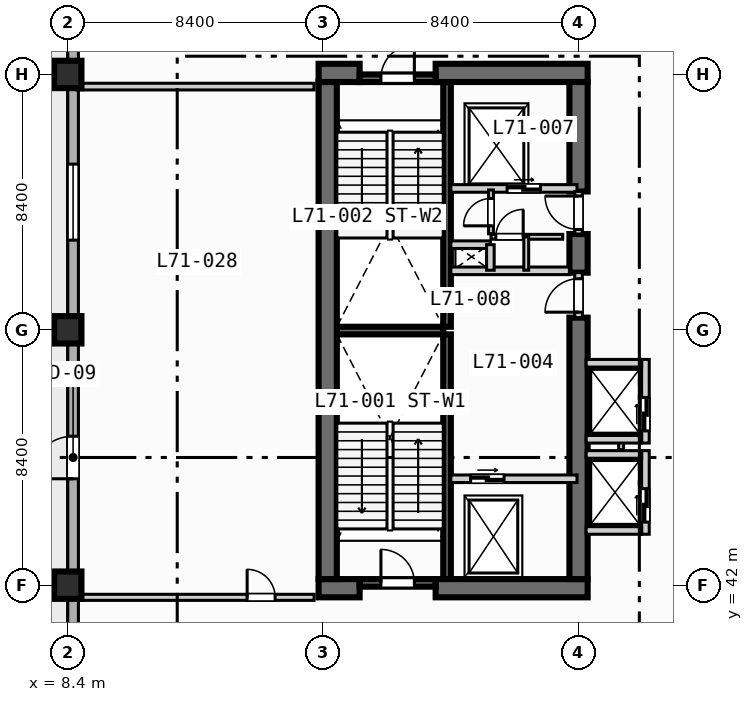
"""IFC4 building model, lengths in metres.
Left out: names, types, materials, properties, quantities, classifications, styles, units other than length and angle.
Written with IfcOpenShell. Run it as: python <this file> out.ifc"""

import sys

from ifc_helpers import new_model, si_unit, direction, frame, frame_2d, origin, origin_2d, place, context, subcontext, project, spatial, rectangle, extrude, element, fill, save


model = new_model("IFC4")
c1 = context("Model", 3, precision=1e-05, world=origin(), true_north=direction((0.0, 1.0)))
c2 = subcontext(c1, "Body", "Model", "MODEL_VIEW")
j1 = project(units=[si_unit("LENGTHUNIT", "METRE"), si_unit("PLANEANGLEUNIT", "RADIAN")], contexts=[c1])
p1 = place(None, origin())
s1 = spatial("IfcSite", under=j1, at=p1, CompositionType="ELEMENT")
p2 = place(p1, origin())
s2 = spatial("IfcBuilding", under=s1, at=p2, CompositionType="ELEMENT")
p3 = place(p2, frame((0.0, 0.0, 286.0)))
s3 = spatial("IfcBuildingStorey", under=s2, at=p3, CompositionType="ELEMENT", Elevation=286.0)
for number, where, z_axis, x_axis in (
    (1, (20.875, 42.2, 0.0), (0.0, 0.0, 1.0), (0.0, 1.0, 0.0)),
    (2, (20.875, 50.5, 0.0), (0.0, 0.0, 1.0), (0.0, 1.0, 0.0)),
):
    element("IfcWall", number, at=place(p3, frame(where, z_axis=z_axis, x_axis=x_axis)), inside=s3, PredefinedType="SOLIDWALL", context=c2, shape_type="SweptSolid", body=[
        extrude(rectangle(XDim=8.05, YDim=0.25, at=frame_2d((4.025, 0.0))), origin(), (0.0, 0.0, 1.0), 4.17),
    ])
p4 = place(p3, frame((17.25, 50.375, 0.0), z_axis=(0.0, 0.0, 1.0), x_axis=(1.0, 0.0, 0.0)))
e3 = element("IfcWall", 3, at=p4, inside=s3, PredefinedType="SOLIDWALL", context=c2, shape_type="SweptSolid", body=[
    extrude(rectangle(XDim=3.5, YDim=0.25, at=frame_2d((1.75, 0.0))), origin(), (0.0, 0.0, 1.0), 4.17),
])
p5 = place(p3, frame((16.65, 41.9, 0.0), z_axis=(0.0, 0.0, 1.0), x_axis=(1.0, 0.0, 0.0)))
e4 = element("IfcWall", 4, at=p5, inside=s3, PredefinedType="SHEAR", context=c2, shape_type="SweptSolid", body=[
    extrude(rectangle(XDim=1.35, YDim=0.6, at=frame_2d((0.675, 0.0))), origin(), (0.0, 0.0, 1.0), 4.17),
])
p6 = place(p3, frame((20.5, 41.9, 0.0), z_axis=(0.0, 0.0, 1.0), x_axis=(1.0, 0.0, 0.0)))
e5 = element("IfcWall", 5, at=p6, inside=s3, PredefinedType="SHEAR", context=c2, shape_type="SweptSolid", body=[
    extrude(rectangle(XDim=5.0, YDim=0.6, at=frame_2d((2.5, 0.0))), origin(), (0.0, 0.0, 1.0), 4.17),
])
p7 = place(p3, frame((16.65, 58.85, 0.0), z_axis=(0.0, 0.0, 1.0), x_axis=(1.0, 0.0, 0.0)))
e6 = element("IfcWall", 6, at=p7, inside=s3, PredefinedType="SHEAR", context=c2, shape_type="SweptSolid", body=[
    extrude(rectangle(XDim=1.35, YDim=0.6, at=frame_2d((0.675, 0.0))), origin(), (0.0, 0.0, 1.0), 4.17),
])
p8 = place(p3, frame((20.5, 58.85, 0.0), z_axis=(0.0, 0.0, 1.0), x_axis=(1.0, 0.0, 0.0)))
e7 = element("IfcWall", 7, at=p8, inside=s3, PredefinedType="SHEAR", context=c2, shape_type="SweptSolid", body=[
    extrude(rectangle(XDim=5.0, YDim=0.6, at=frame_2d((2.5, 0.0))), origin(), (0.0, 0.0, 1.0), 4.17),
])
p9 = place(p3, frame((16.95, 42.2, 0.0), z_axis=(0.0, 0.0, 1.0), x_axis=(0.0, 1.0, 0.0)))
e8 = element("IfcWall", 8, at=p9, inside=s3, PredefinedType="SHEAR", context=c2, shape_type="SweptSolid", body=[
    extrude(rectangle(XDim=16.35, YDim=0.6, at=frame_2d((8.175, 0.0))), origin(), (0.0, 0.0, 1.0), 4.17),
])
p10 = place(p3, frame((25.2, 42.2, 0.0), z_axis=(0.0, 0.0, 1.0), x_axis=(0.0, 1.0, 0.0)))
e9 = element("IfcWall", 9, at=p10, inside=s3, PredefinedType="SHEAR", context=c2, shape_type="SweptSolid", body=[
    extrude(rectangle(XDim=8.6, YDim=0.6, at=frame_2d((4.3, 0.0))), origin(), (0.0, 0.0, 1.0), 4.17),
])
p11 = place(p3, frame((25.2, 52.28, 0.0), z_axis=(0.0, 0.0, 1.0), x_axis=(0.0, 1.0, 0.0)))
e10 = element("IfcWall", 10, at=p11, inside=s3, PredefinedType="SHEAR", context=c2, shape_type="SweptSolid", body=[
    extrude(rectangle(XDim=1.27, YDim=0.6, at=frame_2d((0.635, 0.0))), origin(), (0.0, 0.0, 1.0), 4.17),
])
p12 = place(p3, frame((25.2, 54.95, 0.0), z_axis=(0.0, 0.0, 1.0), x_axis=(0.0, 1.0, 0.0)))
e11 = element("IfcWall", 11, at=p12, inside=s3, PredefinedType="SHEAR", context=c2, shape_type="SweptSolid", body=[
    extrude(rectangle(XDim=3.6, YDim=0.6, at=frame_2d((1.8, 0.0))), origin(), (0.0, 0.0, 1.0), 4.17),
])
for number, where, z_axis, x_axis in (
    (12, (8.4, 42.0, 0.0), (0.0, 0.0, 1.0), (1.0, 0.0, 0.0)),
    (13, (8.4, 50.4, 0.0), (0.0, 0.0, 1.0), (1.0, 0.0, 0.0)),
    (14, (8.4, 58.8, 0.0), (0.0, 0.0, 1.0), (1.0, 0.0, 0.0)),
):
    element("IfcColumn", number, at=place(p3, frame(where, z_axis=z_axis, x_axis=x_axis)), inside=s3, PredefinedType="COLUMN", context=c2, shape_type="SweptSolid", body=[
        extrude(rectangle(XDim=0.9, YDim=0.9, at=origin_2d()), origin(), (0.0, 0.0, 1.0), 4.4),
    ])
p13 = place(p3, frame((8.575, 11.575, 0.0), z_axis=(0.0, 0.0, 1.0), x_axis=(0.0, 1.0, 0.0)))
e15 = element("IfcWall", 15, at=p13, inside=s3, PredefinedType="STANDARD", context=c2, shape_type="SweptSolid", body=[
    extrude(rectangle(XDim=60.85, YDim=0.35, at=frame_2d((30.425, 0.0))), origin(), (0.0, 0.0, 1.0), 4.17),
])
p14 = place(p13, frame((33.925, 0.0, 0.0)))
e16 = element("IfcOpeningElement", 16, at=p14, cuts=e15, PredefinedType="OPENING", context=c2, shape_type="SweptSolid", body=[
    extrude(rectangle(XDim=1.4, YDim=2.2, at=frame_2d((0.7, 1.1))), frame((0.0, 0.185, 0.0), z_axis=(0.0, -1.0, 0.0), x_axis=(1.0, 0.0, 0.0)), (0.0, 0.0, 1.0), 0.37),
])
p15 = place(p13, frame((8.175, 0.0, 0.85)))
e17 = element("IfcOpeningElement", 17, at=p15, cuts=e15, PredefinedType="OPENING", context=c2, shape_type="SweptSolid", body=[
    extrude(rectangle(XDim=2.5, YDim=2.2, at=frame_2d((1.25, 1.1))), frame((0.0, 0.185, 0.0), z_axis=(0.0, -1.0, 0.0), x_axis=(1.0, 0.0, 0.0)), (0.0, 0.0, 1.0), 0.37),
])
p16 = place(p13, frame((16.575, 0.0, 0.85)))
e18 = element("IfcOpeningElement", 18, at=p16, cuts=e15, PredefinedType="OPENING", context=c2, shape_type="SweptSolid", body=[
    extrude(rectangle(XDim=2.5, YDim=2.2, at=frame_2d((1.25, 1.1))), frame((0.0, 0.185, 0.0), z_axis=(0.0, -1.0, 0.0), x_axis=(1.0, 0.0, 0.0)), (0.0, 0.0, 1.0), 0.37),
])
p17 = place(p13, frame((24.975, 0.0, 0.85)))
e19 = element("IfcOpeningElement", 19, at=p17, cuts=e15, PredefinedType="OPENING", context=c2, shape_type="SweptSolid", body=[
    extrude(rectangle(XDim=2.5, YDim=2.2, at=frame_2d((1.25, 1.1))), frame((0.0, 0.185, 0.0), z_axis=(0.0, -1.0, 0.0), x_axis=(1.0, 0.0, 0.0)), (0.0, 0.0, 1.0), 0.37),
])
p18 = place(p13, frame((41.775, 0.0, 0.85)))
e20 = element("IfcOpeningElement", 20, at=p18, cuts=e15, PredefinedType="OPENING", context=c2, shape_type="SweptSolid", body=[
    extrude(rectangle(XDim=2.5, YDim=2.2, at=frame_2d((1.25, 1.1))), frame((0.0, 0.185, 0.0), z_axis=(0.0, -1.0, 0.0), x_axis=(1.0, 0.0, 0.0)), (0.0, 0.0, 1.0), 0.37),
])
p19 = place(p3, frame((18.0, 42.075, 0.0), z_axis=(0.0, 0.0, 1.0), x_axis=(1.0, 0.0, 0.0)))
e21 = element("IfcWall", 21, at=p19, inside=s3, PredefinedType="SOLIDWALL", context=c2, shape_type="SweptSolid", body=[
    extrude(rectangle(XDim=2.5, YDim=0.25, at=frame_2d((1.25, 0.0))), origin(), (0.0, 0.0, 1.0), 4.17),
])
p20 = place(p19, frame((0.7, 0.0, 0.0)))
e22 = element("IfcOpeningElement", 22, at=p20, cuts=e21, PredefinedType="OPENING", context=c2, shape_type="SweptSolid", body=[
    extrude(rectangle(XDim=1.1, YDim=2.15, at=frame_2d((0.55, 1.075))), frame((0.0, 0.135, 0.0), z_axis=(0.0, -1.0, 0.0), x_axis=(1.0, 0.0, 0.0)), (0.0, 0.0, 1.0), 0.27),
])
p21 = place(p3, frame((18.0, 58.675, 0.0), z_axis=(0.0, 0.0, 1.0), x_axis=(1.0, 0.0, 0.0)))
e23 = element("IfcWall", 23, at=p21, inside=s3, PredefinedType="SOLIDWALL", context=c2, shape_type="SweptSolid", body=[
    extrude(rectangle(XDim=2.5, YDim=0.25, at=frame_2d((1.25, 0.0))), origin(), (0.0, 0.0, 1.0), 4.17),
])
p22 = place(p21, frame((0.7, 0.0, 0.0)))
e24 = element("IfcOpeningElement", 24, at=p22, cuts=e23, PredefinedType="OPENING", context=c2, shape_type="SweptSolid", body=[
    extrude(rectangle(XDim=1.1, YDim=2.15, at=frame_2d((0.55, 1.075))), frame((0.0, 0.135, 0.0), z_axis=(0.0, -1.0, 0.0), x_axis=(1.0, 0.0, 0.0)), (0.0, 0.0, 1.0), 0.27),
])
p23 = place(p3, frame((21.0, 45.5, 0.0), z_axis=(0.0, 0.0, 1.0), x_axis=(1.0, 0.0, 0.0)))
e25 = element("IfcWall", 25, at=p23, inside=s3, PredefinedType="SOLIDWALL", context=c2, shape_type="SweptSolid", body=[
    extrude(rectangle(XDim=4.15, YDim=0.25, at=frame_2d((2.075, 0.0))), origin(), (0.0, 0.0, 1.0), 4.17),
])
p24 = place(p23, frame((0.65, 0.0, 0.0)))
e26 = element("IfcOpeningElement", 26, at=p24, cuts=e25, PredefinedType="OPENING", context=c2, shape_type="SweptSolid", body=[
    extrude(rectangle(XDim=1.1, YDim=2.15, at=frame_2d((0.55, 1.075))), frame((0.0, 0.135, 0.0), z_axis=(0.0, -1.0, 0.0), x_axis=(1.0, 0.0, 0.0)), (0.0, 0.0, 1.0), 0.27),
])
p25 = place(p3, frame((25.2, 50.8, 0.0), z_axis=(0.0, 0.0, 1.0), x_axis=(0.0, 1.0, 0.0)))
e27 = element("IfcWall", 27, at=p25, inside=s3, PredefinedType="SOLIDWALL", context=c2, shape_type="SweptSolid", body=[
    extrude(rectangle(XDim=1.48, YDim=0.25, at=frame_2d((0.74, 0.0))), origin(), (0.0, 0.0, 1.0), 4.17),
])
p26 = place(p25, frame((0.18, 0.0, 0.0)))
e28 = element("IfcOpeningElement", 28, at=p26, cuts=e27, PredefinedType="OPENING", context=c2, shape_type="SweptSolid", body=[
    extrude(rectangle(XDim=1.1, YDim=2.15, at=frame_2d((0.55, 1.075))), frame((0.0, 0.135, 0.0), z_axis=(0.0, -1.0, 0.0), x_axis=(1.0, 0.0, 0.0)), (0.0, 0.0, 1.0), 0.27),
])
p27 = place(p3, frame((21.0, 52.34, 0.0), z_axis=(0.0, 0.0, 1.0), x_axis=(1.0, 0.0, 0.0)))
e29 = element("IfcWall", 29, at=p27, inside=s3, PredefinedType="SOLIDWALL", context=c2, shape_type="SweptSolid", body=[
    extrude(rectangle(XDim=3.9, YDim=0.25, at=frame_2d((1.95, 0.0))), origin(), (0.0, 0.0, 1.0), 4.17),
])
p28 = place(p3, frame((21.0, 55.05, 0.0), z_axis=(0.0, 0.0, 1.0), x_axis=(1.0, 0.0, 0.0)))
e30 = element("IfcWall", 30, at=p28, inside=s3, PredefinedType="SOLIDWALL", context=c2, shape_type="SweptSolid", body=[
    extrude(rectangle(XDim=4.15, YDim=0.25, at=frame_2d((2.075, 0.0))), origin(), (0.0, 0.0, 1.0), 4.17),
])
p29 = place(p28, frame((1.85, 0.0, 0.0)))
e31 = element("IfcOpeningElement", 31, at=p29, cuts=e30, PredefinedType="OPENING", context=c2, shape_type="SweptSolid", body=[
    extrude(rectangle(XDim=1.1, YDim=2.15, at=frame_2d((0.55, 1.075))), frame((0.0, 0.135, 0.0), z_axis=(0.0, -1.0, 0.0), x_axis=(1.0, 0.0, 0.0)), (0.0, 0.0, 1.0), 0.27),
])
p30 = place(p3, frame((25.2, 53.55, 0.0), z_axis=(0.0, 0.0, 1.0), x_axis=(0.0, 1.0, 0.0)))
e32 = element("IfcWall", 32, at=p30, inside=s3, PredefinedType="SOLIDWALL", context=c2, shape_type="SweptSolid", body=[
    extrude(rectangle(XDim=1.4, YDim=0.25, at=frame_2d((0.7, 0.0))), origin(), (0.0, 0.0, 1.0), 4.17),
])
p31 = place(p30, frame((0.15, 0.0, 0.0)))
e33 = element("IfcOpeningElement", 33, at=p31, cuts=e32, PredefinedType="OPENING", context=c2, shape_type="SweptSolid", body=[
    extrude(rectangle(XDim=1.1, YDim=2.15, at=frame_2d((0.55, 1.075))), frame((0.0, 0.135, 0.0), z_axis=(0.0, -1.0, 0.0), x_axis=(1.0, 0.0, 0.0)), (0.0, 0.0, 1.0), 0.27),
])
p32 = place(p3, frame((21.0, 53.2, 0.0), z_axis=(0.0, 0.0, 1.0), x_axis=(1.0, 0.0, 0.0)))
e34 = element("IfcWall", 34, at=p32, inside=s3, PredefinedType="SOLIDWALL", context=c2, shape_type="SweptSolid", body=[
    extrude(rectangle(XDim=1.3, YDim=0.25, at=frame_2d((0.65, 0.0))), origin(), (0.0, 0.0, 1.0), 4.17),
])
p33 = place(p3, frame((22.3, 52.36, 0.0), z_axis=(0.0, 0.0, 1.0), x_axis=(0.0, 1.0, 0.0)))
e35 = element("IfcWall", 35, at=p33, inside=s3, PredefinedType="SOLIDWALL", context=c2, shape_type="SweptSolid", body=[
    extrude(rectangle(XDim=0.84, YDim=0.25, at=frame_2d((0.42, 0.0))), origin(), (0.0, 0.0, 1.0), 4.17),
])
p34 = place(p3, frame((22.32, 53.56, 0.0), z_axis=(0.0, 0.0, 1.0), x_axis=(0.0, 1.0, 0.0)))
e36 = element("IfcWall", 36, at=p34, inside=s3, PredefinedType="PARTITIONING", context=c2, shape_type="SweptSolid", body=[
    extrude(rectangle(XDim=1.44, YDim=0.16, at=frame_2d((0.72, 0.0))), origin(), (0.0, 0.0, 1.0), 4.17),
])
p35 = place(p34, frame((0.26, 0.0, 0.0)))
e37 = element("IfcOpeningElement", 37, at=p35, cuts=e36, PredefinedType="OPENING", context=c2, shape_type="SweptSolid", body=[
    extrude(rectangle(XDim=0.9, YDim=2.1, at=frame_2d((0.45, 1.05))), frame((0.0, 0.09, 0.0), z_axis=(0.0, -1.0, 0.0), x_axis=(1.0, 0.0, 0.0)), (0.0, 0.0, 1.0), 0.18),
])
p36 = place(p3, frame((22.32, 53.46, 0.0), z_axis=(0.0, 0.0, 1.0), x_axis=(1.0, 0.0, 0.0)))
e38 = element("IfcWall", 38, at=p36, inside=s3, PredefinedType="PARTITIONING", context=c2, shape_type="SweptSolid", body=[
    extrude(rectangle(XDim=2.36, YDim=0.16, at=frame_2d((1.18, 0.0))), origin(), (0.0, 0.0, 1.0), 4.17),
])
p37 = place(p36, frame((0.16, 0.0, 0.0)))
e39 = element("IfcOpeningElement", 39, at=p37, cuts=e38, PredefinedType="OPENING", context=c2, shape_type="SweptSolid", body=[
    extrude(rectangle(XDim=0.9, YDim=2.1, at=frame_2d((0.45, 1.05))), frame((0.0, 0.09, 0.0), z_axis=(0.0, -1.0, 0.0), x_axis=(1.0, 0.0, 0.0)), (0.0, 0.0, 1.0), 0.18),
])
p38 = place(p3, frame((23.48, 52.36, 0.0), z_axis=(0.0, 0.0, 1.0), x_axis=(0.0, 1.0, 0.0)))
e40 = element("IfcWall", 40, at=p38, inside=s3, PredefinedType="PARTITIONING", context=c2, shape_type="SweptSolid", body=[
    extrude(rectangle(XDim=1.1, YDim=0.16, at=frame_2d((0.55, 0.0))), origin(), (0.0, 0.0, 1.0), 4.17),
])
p39 = place(p3, frame((27.4, 43.675, 0.0), z_axis=(0.0, 0.0, 1.0), x_axis=(0.0, 1.0, 0.0)))
e41 = element("IfcWall", 41, at=p39, inside=s3, PredefinedType="SOLIDWALL", context=c2, shape_type="SweptSolid", body=[
    extrude(rectangle(XDim=2.75, YDim=0.25, at=frame_2d((1.375, 0.0))), origin(), (0.0, 0.0, 1.0), 4.17),
])
p40 = place(p39, frame((0.4, 0.0, 0.0)))
e42 = element("IfcOpeningElement", 42, at=p40, cuts=e41, PredefinedType="OPENING", context=c2, shape_type="SweptSolid", body=[
    extrude(rectangle(XDim=1.1, YDim=2.15, at=frame_2d((0.55, 1.075))), frame((0.0, 0.135, 0.0), z_axis=(0.0, -1.0, 0.0), x_axis=(1.0, 0.0, 0.0)), (0.0, 0.0, 1.0), 0.27),
])
for number, where, z_axis, x_axis in (
    (43, (25.45, 43.8, 0.0), (0.0, 0.0, 1.0), (1.0, 0.0, 0.0)),
    (44, (25.45, 46.3, 0.0), (0.0, 0.0, 1.0), (1.0, 0.0, 0.0)),
):
    element("IfcWall", number, at=place(p3, frame(where, z_axis=z_axis, x_axis=x_axis)), inside=s3, PredefinedType="SOLIDWALL", context=c2, shape_type="SweptSolid", body=[
        extrude(rectangle(XDim=1.825, YDim=0.25, at=frame_2d((0.913, 0.0))), origin(), (0.0, 0.0, 1.0), 4.17),
    ])
p41 = place(p3, frame((26.6, 46.46, 0.0), z_axis=(0.0, 0.0, 1.0), x_axis=(0.0, 1.0, 0.0)))
e45 = element("IfcWall", 45, at=p41, inside=s3, PredefinedType="PARTITIONING", context=c2, shape_type="SweptSolid", body=[
    extrude(rectangle(XDim=0.88, YDim=0.16, at=frame_2d((0.44, 0.0))), origin(), (0.0, 0.0, 1.0), 4.17),
])
p42 = place(p3, frame((27.4, 46.675, 0.0), z_axis=(0.0, 0.0, 1.0), x_axis=(0.0, 1.0, 0.0)))
e46 = element("IfcWall", 46, at=p42, inside=s3, PredefinedType="SOLIDWALL", context=c2, shape_type="SweptSolid", body=[
    extrude(rectangle(XDim=2.75, YDim=0.25, at=frame_2d((1.375, 0.0))), origin(), (0.0, 0.0, 1.0), 4.17),
])
p43 = place(p42, frame((0.4, 0.0, 0.0)))
e47 = element("IfcOpeningElement", 47, at=p43, cuts=e46, PredefinedType="OPENING", context=c2, shape_type="SweptSolid", body=[
    extrude(rectangle(XDim=1.1, YDim=2.15, at=frame_2d((0.55, 1.075))), frame((0.0, 0.135, 0.0), z_axis=(0.0, -1.0, 0.0), x_axis=(1.0, 0.0, 0.0)), (0.0, 0.0, 1.0), 0.27),
])
for number, where, z_axis, x_axis in (
    (48, (25.45, 46.8, 0.0), (0.0, 0.0, 1.0), (1.0, 0.0, 0.0)),
    (49, (25.45, 49.3, 0.0), (0.0, 0.0, 1.0), (1.0, 0.0, 0.0)),
):
    element("IfcWall", number, at=place(p3, frame(where, z_axis=z_axis, x_axis=x_axis)), inside=s3, PredefinedType="SOLIDWALL", context=c2, shape_type="SweptSolid", body=[
        extrude(rectangle(XDim=1.825, YDim=0.25, at=frame_2d((0.913, 0.0))), origin(), (0.0, 0.0, 1.0), 4.17),
    ])
p44 = place(p3, frame((8.7, 41.6, 0.0), z_axis=(0.0, 0.0, 1.0), x_axis=(1.0, 0.0, 0.0)))
e50 = element("IfcWall", 50, at=p44, inside=s3, PredefinedType="PARTITIONING", context=c2, shape_type="SweptSolid", body=[
    extrude(rectangle(XDim=7.8, YDim=0.2, at=frame_2d((3.9, 0.0))), origin(), (0.0, 0.0, 1.0), 4.17),
])
p45 = place(p44, frame((5.6, 0.0, 0.0)))
e51 = element("IfcOpeningElement", 51, at=p45, cuts=e50, PredefinedType="OPENING", context=c2, shape_type="SweptSolid", body=[
    extrude(rectangle(XDim=0.92, YDim=2.1, at=frame_2d((0.46, 1.05))), frame((0.0, 0.11, 0.0), z_axis=(0.0, -1.0, 0.0), x_axis=(1.0, 0.0, 0.0)), (0.0, 0.0, 1.0), 0.22),
])
p46 = place(p3, frame((8.7, 58.4, 0.0), z_axis=(0.0, 0.0, 1.0), x_axis=(1.0, 0.0, 0.0)))
e52 = element("IfcWall", 52, at=p46, inside=s3, PredefinedType="PARTITIONING", context=c2, shape_type="SweptSolid", body=[
    extrude(rectangle(XDim=7.8, YDim=0.22, at=frame_2d((3.9, 0.0))), origin(), (0.0, 0.0, 1.0), 4.17),
])
p47 = place(p14, origin())
e53 = element("IfcDoor", 53, at=p47, inside=s3, OperationType="SINGLE_SWING_LEFT", PredefinedType="DOOR", context=c2, shape_type="SweptSolid", body=[
    extrude(rectangle(XDim=1.4, YDim=2.2, at=frame_2d((0.7, 1.1))), frame((0.0, 0.025, 0.0), z_axis=(0.0, -1.0, 0.0), x_axis=(1.0, 0.0, 0.0)), (0.0, 0.0, 1.0), 0.05),
])
fill(e16, e53)
p48 = place(p18, origin())
e54 = element("IfcWindow", 54, at=p48, inside=s3, PartitioningType="SINGLE_PANEL", PredefinedType="WINDOW", context=c2, shape_type="SweptSolid", body=[
    extrude(rectangle(XDim=2.5, YDim=2.2, at=frame_2d((1.25, 1.1))), frame((0.0, 0.03, 0.0), z_axis=(0.0, -1.0, 0.0), x_axis=(1.0, 0.0, 0.0)), (0.0, 0.0, 1.0), 0.06),
])
fill(e20, e54)
p49 = place(p20, origin())
e55 = element("IfcDoor", 55, at=p49, inside=s3, OperationType="SINGLE_SWING_LEFT", PredefinedType="DOOR", context=c2, shape_type="SweptSolid", body=[
    extrude(rectangle(XDim=1.1, YDim=2.15, at=frame_2d((0.55, 1.075))), frame((0.0, 0.025, 0.0), z_axis=(0.0, -1.0, 0.0), x_axis=(1.0, 0.0, 0.0)), (0.0, 0.0, 1.0), 0.05),
])
fill(e22, e55)
p50 = place(p22, origin())
e56 = element("IfcDoor", 56, at=p50, inside=s3, OperationType="SINGLE_SWING_RIGHT", PredefinedType="DOOR", context=c2, shape_type="SweptSolid", body=[
    extrude(rectangle(XDim=1.1, YDim=2.15, at=frame_2d((0.55, 1.075))), frame((0.0, 0.025, 0.0), z_axis=(0.0, -1.0, 0.0), x_axis=(1.0, 0.0, 0.0)), (0.0, 0.0, 1.0), 0.05),
])
fill(e24, e56)
p51 = place(p24, origin())
e57 = element("IfcDoor", 57, at=p51, inside=s3, OperationType="SLIDING_TO_LEFT", PredefinedType="DOOR", context=c2, shape_type="SweptSolid", body=[
    extrude(rectangle(XDim=1.1, YDim=2.15, at=frame_2d((0.55, 1.075))), frame((0.0, 0.025, 0.0), z_axis=(0.0, -1.0, 0.0), x_axis=(1.0, 0.0, 0.0)), (0.0, 0.0, 1.0), 0.05),
])
fill(e26, e57)
p52 = place(p26, origin())
e58 = element("IfcDoor", 58, at=p52, inside=s3, OperationType="SINGLE_SWING_LEFT", PredefinedType="DOOR", context=c2, shape_type="SweptSolid", body=[
    extrude(rectangle(XDim=1.1, YDim=2.15, at=frame_2d((0.55, 1.075))), frame((0.0, 0.025, 0.0), z_axis=(0.0, -1.0, 0.0), x_axis=(1.0, 0.0, 0.0)), (0.0, 0.0, 1.0), 0.05),
])
fill(e28, e58)
p53 = place(p29, origin())
e59 = element("IfcDoor", 59, at=p53, inside=s3, OperationType="SLIDING_TO_LEFT", PredefinedType="DOOR", context=c2, shape_type="SweptSolid", body=[
    extrude(rectangle(XDim=1.1, YDim=2.15, at=frame_2d((0.55, 1.075))), frame((0.0, 0.025, 0.0), z_axis=(0.0, -1.0, 0.0), x_axis=(1.0, 0.0, 0.0)), (0.0, 0.0, 1.0), 0.05),
])
fill(e31, e59)
p54 = place(p31, origin())
e60 = element("IfcDoor", 60, at=p54, inside=s3, OperationType="SINGLE_SWING_RIGHT", PredefinedType="DOOR", context=c2, shape_type="SweptSolid", body=[
    extrude(rectangle(XDim=1.1, YDim=2.15, at=frame_2d((0.55, 1.075))), frame((0.0, 0.025, 0.0), z_axis=(0.0, -1.0, 0.0), x_axis=(1.0, 0.0, 0.0)), (0.0, 0.0, 1.0), 0.05),
])
fill(e33, e60)
p55 = place(p35, origin())
e61 = element("IfcDoor", 61, at=p55, inside=s3, OperationType="SINGLE_SWING_LEFT", PredefinedType="DOOR", context=c2, shape_type="SweptSolid", body=[
    extrude(rectangle(XDim=0.9, YDim=2.1, at=frame_2d((0.45, 1.05))), frame((0.0, 0.025, 0.0), z_axis=(0.0, -1.0, 0.0), x_axis=(1.0, 0.0, 0.0)), (0.0, 0.0, 1.0), 0.05),
])
fill(e37, e61)
p56 = place(p37, origin())
e62 = element("IfcDoor", 62, at=p56, inside=s3, OperationType="SINGLE_SWING_RIGHT", PredefinedType="DOOR", context=c2, shape_type="SweptSolid", body=[
    extrude(rectangle(XDim=0.9, YDim=2.1, at=frame_2d((0.45, 1.05))), frame((0.0, 0.025, 0.0), z_axis=(0.0, -1.0, 0.0), x_axis=(1.0, 0.0, 0.0)), (0.0, 0.0, 1.0), 0.05),
])
fill(e39, e62)
p57 = place(p40, origin())
e63 = element("IfcDoor", 63, at=p57, inside=s3, OperationType="SLIDING_TO_LEFT", PredefinedType="DOOR", context=c2, shape_type="SweptSolid", body=[
    extrude(rectangle(XDim=1.1, YDim=2.15, at=frame_2d((0.55, 1.075))), frame((0.0, 0.025, 0.0), z_axis=(0.0, -1.0, 0.0), x_axis=(1.0, 0.0, 0.0)), (0.0, 0.0, 1.0), 0.05),
])
fill(e42, e63)
p58 = place(p43, origin())
e64 = element("IfcDoor", 64, at=p58, inside=s3, OperationType="SLIDING_TO_LEFT", PredefinedType="DOOR", context=c2, shape_type="SweptSolid", body=[
    extrude(rectangle(XDim=1.1, YDim=2.15, at=frame_2d((0.55, 1.075))), frame((0.0, 0.025, 0.0), z_axis=(0.0, -1.0, 0.0), x_axis=(1.0, 0.0, 0.0)), (0.0, 0.0, 1.0), 0.05),
])
fill(e47, e64)
p59 = place(p45, origin())
e65 = element("IfcDoor", 65, at=p59, inside=s3, OperationType="SINGLE_SWING_LEFT", PredefinedType="DOOR", context=c2, shape_type="SweptSolid", body=[
    extrude(rectangle(XDim=0.92, YDim=2.1, at=frame_2d((0.46, 1.05))), frame((0.0, 0.025, 0.0), z_axis=(0.0, -1.0, 0.0), x_axis=(1.0, 0.0, 0.0)), (0.0, 0.0, 1.0), 0.05),
])
fill(e51, e65)
save(model, sys.argv[1])
